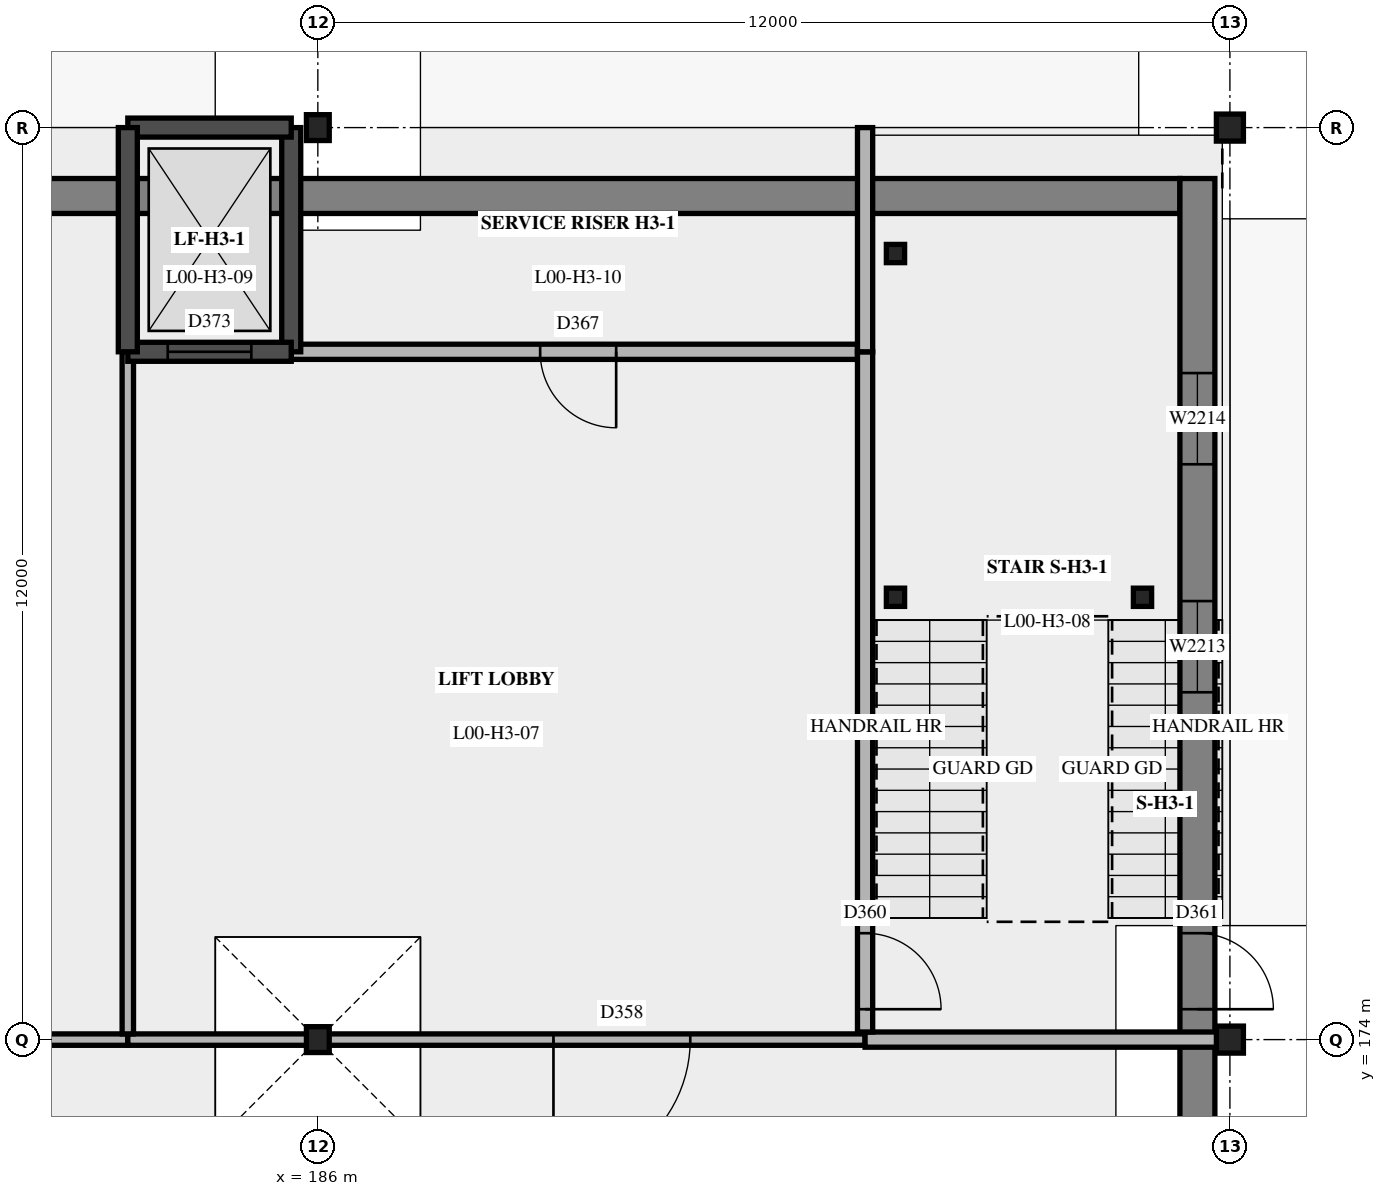
"""IFC4 building model, lengths in metres.
Left out: names, types, materials, properties, quantities, classifications, styles, units other than length and angle.
Written with IfcOpenShell. Run it as: python <this file> out.ifc"""

import sys

from ifc_helpers import new_model, si_unit, direction, frame, frame_2d, origin, origin_2d, place, context, subcontext, project, spatial, rectangle, hollow_circle, i_section, extrude, element, fill, save


model = new_model("IFC4")
c1 = context("Model", 3, precision=1e-05, world=origin(), true_north=direction((0.0, 1.0)))
c2 = subcontext(c1, "Body", "Model", "MODEL_VIEW")
j1 = project(units=[si_unit("LENGTHUNIT", "METRE"), si_unit("PLANEANGLEUNIT", "RADIAN")], contexts=[c1])
p1 = place(None, origin())
s1 = spatial("IfcSite", under=j1, at=p1, CompositionType="ELEMENT")
p2 = place(p1, origin())
s2 = spatial("IfcBuilding", under=s1, at=p2, CompositionType="ELEMENT")
p3 = place(p2, origin())
s3 = spatial("IfcBuildingStorey", under=s2, at=p3, CompositionType="ELEMENT", Elevation=0.0)
for number, where, z_axis, x_axis in (
    (1, (198.0, 174.0, 0.0), (0.0, 0.0, 1.0), (1.0, 0.0, 0.0)),
    (2, (198.0, 186.0, 0.0), (0.0, 0.0, 1.0), (1.0, 0.0, 0.0)),
):
    element("IfcColumn", number, at=place(p3, frame(where, z_axis=z_axis, x_axis=x_axis)), inside=s3, PredefinedType="COLUMN", context=c2, shape_type="SweptSolid", body=[
        extrude(hollow_circle(Radius=0.178, WallThickness=0.012, at=origin_2d()), origin(), (0.0, 0.0, 1.0), 5.4),
    ])
for number, where, z_axis, x_axis in (
    (3, (186.0, 174.0, 0.0), (0.0, 0.0, 1.0), (1.0, 0.0, 0.0)),
    (4, (186.0, 186.0, 0.0), (0.0, 0.0, 1.0), (1.0, 0.0, 0.0)),
):
    element("IfcColumn", number, at=place(p3, frame(where, z_axis=z_axis, x_axis=x_axis)), inside=s3, PredefinedType="COLUMN", context=c2, shape_type="SweptSolid", body=[
        extrude(i_section(OverallWidth=0.3, OverallDepth=0.34, WebThickness=0.012, FlangeThickness=0.021, at=origin_2d()), origin(), (0.0, 0.0, 1.0), 4.65),
    ])
p4 = place(p3, frame((162.658, 185.1, 0.0), z_axis=(0.0, 0.0, 1.0), x_axis=(1.0, 0.0, 0.0)))
e5 = element("IfcWall", 5, at=p4, inside=s3, PredefinedType="SOLIDWALL", context=c2, shape_type="SweptSolid", body=[
    extrude(rectangle(XDim=34.685, YDim=0.46, at=frame_2d((17.342, 0.0))), origin(), (0.0, 0.0, 1.0), 5.4),
])
p5 = place(p4, frame((9.9, 0.0, 0.9)))
e6 = element("IfcOpeningElement", 6, at=p5, cuts=e5, PredefinedType="OPENING", context=c2, shape_type="SweptSolid", body=[
    extrude(rectangle(XDim=1.2, YDim=3.3, at=frame_2d((0.6, 1.65))), frame((0.0, 0.24, 0.0), z_axis=(0.0, -1.0, 0.0), x_axis=(1.0, 0.0, 0.0)), (0.0, 0.0, 1.0), 0.48),
])
p6 = place(p4, frame((12.9, 0.0, 0.9)))
e7 = element("IfcOpeningElement", 7, at=p6, cuts=e5, PredefinedType="OPENING", context=c2, shape_type="SweptSolid", body=[
    extrude(rectangle(XDim=1.2, YDim=3.3, at=frame_2d((0.6, 1.65))), frame((0.0, 0.24, 0.0), z_axis=(0.0, -1.0, 0.0), x_axis=(1.0, 0.0, 0.0)), (0.0, 0.0, 1.0), 0.48),
])
p7 = place(p4, frame((15.9, 0.0, 0.9)))
e8 = element("IfcOpeningElement", 8, at=p7, cuts=e5, PredefinedType="OPENING", context=c2, shape_type="SweptSolid", body=[
    extrude(rectangle(XDim=1.2, YDim=3.3, at=frame_2d((0.6, 1.65))), frame((0.0, 0.24, 0.0), z_axis=(0.0, -1.0, 0.0), x_axis=(1.0, 0.0, 0.0)), (0.0, 0.0, 1.0), 0.48),
])
p8 = place(p3, frame((197.572, 138.67, 0.0), z_axis=(0.0, 0.0, 1.0), x_axis=(0.0, 1.0, 0.0)))
e9 = element("IfcWall", 9, at=p8, inside=s3, PredefinedType="SOLIDWALL", context=c2, shape_type="SweptSolid", body=[
    extrude(rectangle(XDim=46.66, YDim=0.46, at=frame_2d((23.33, 0.0))), origin(), (0.0, 0.0, 1.0), 5.4),
])
p9 = place(p8, frame((1.73, 0.0, 0.0)))
e10 = element("IfcOpeningElement", 10, at=p9, cuts=e9, PredefinedType="OPENING", context=c2, shape_type="SweptSolid", body=[
    extrude(rectangle(XDim=3.2, YDim=3.6, at=frame_2d((1.6, 1.8))), frame((0.0, 0.24, 0.0), z_axis=(0.0, -1.0, 0.0), x_axis=(1.0, 0.0, 0.0)), (0.0, 0.0, 1.0), 0.48),
])
p10 = place(p8, frame((36.73, 0.0, 0.0), z_axis=(0.0, 0.0, 1.0), x_axis=(-1.0, 0.0, 0.0)))
e11 = element("IfcOpeningElement", 11, at=p10, cuts=e9, PredefinedType="OPENING", context=c2, shape_type="SweptSolid", body=[
    extrude(rectangle(XDim=1.0, YDim=2.1, at=frame_2d((0.5, 1.05))), frame((0.0, 0.24, 0.0), z_axis=(0.0, -1.0, 0.0), x_axis=(1.0, 0.0, 0.0)), (0.0, 0.0, 1.0), 0.48),
])
p11 = place(p8, frame((15.73, 0.0, 0.0)))
e12 = element("IfcOpeningElement", 12, at=p11, cuts=e9, PredefinedType="OPENING", context=c2, shape_type="SweptSolid", body=[
    extrude(rectangle(XDim=3.2, YDim=3.6, at=frame_2d((1.6, 1.8))), frame((0.0, 0.24, 0.0), z_axis=(0.0, -1.0, 0.0), x_axis=(1.0, 0.0, 0.0)), (0.0, 0.0, 1.0), 0.48),
])
p12 = place(p8, frame((27.73, 0.0, 0.0)))
e13 = element("IfcOpeningElement", 13, at=p12, cuts=e9, PredefinedType="OPENING", context=c2, shape_type="SweptSolid", body=[
    extrude(rectangle(XDim=3.2, YDim=3.6, at=frame_2d((1.6, 1.8))), frame((0.0, 0.24, 0.0), z_axis=(0.0, -1.0, 0.0), x_axis=(1.0, 0.0, 0.0)), (0.0, 0.0, 1.0), 0.48),
])
p13 = place(p8, frame((26.83, 0.0, 0.0), z_axis=(0.0, 0.0, 1.0), x_axis=(-1.0, 0.0, 0.0)))
e14 = element("IfcOpeningElement", 14, at=p13, cuts=e9, PredefinedType="OPENING", context=c2, shape_type="SweptSolid", body=[
    extrude(rectangle(XDim=1.0, YDim=2.1, at=frame_2d((0.5, 1.05))), frame((0.0, 0.24, 0.0), z_axis=(0.0, -1.0, 0.0), x_axis=(1.0, 0.0, 0.0)), (0.0, 0.0, 1.0), 0.48),
])
p14 = place(p8, frame((39.9, 0.0, 0.9)))
e15 = element("IfcOpeningElement", 15, at=p14, cuts=e9, PredefinedType="OPENING", context=c2, shape_type="SweptSolid", body=[
    extrude(rectangle(XDim=1.2, YDim=3.3, at=frame_2d((0.6, 1.65))), frame((0.0, 0.24, 0.0), z_axis=(0.0, -1.0, 0.0), x_axis=(1.0, 0.0, 0.0)), (0.0, 0.0, 1.0), 0.48),
])
p15 = place(p8, frame((42.9, 0.0, 0.9)))
e16 = element("IfcOpeningElement", 16, at=p15, cuts=e9, PredefinedType="OPENING", context=c2, shape_type="SweptSolid", body=[
    extrude(rectangle(XDim=1.2, YDim=3.3, at=frame_2d((0.6, 1.65))), frame((0.0, 0.24, 0.0), z_axis=(0.0, -1.0, 0.0), x_axis=(1.0, 0.0, 0.0)), (0.0, 0.0, 1.0), 0.48),
])
p16 = place(p3, frame((162.0, 174.0, 0.0), z_axis=(0.0, 0.0, 1.0), x_axis=(1.0, 0.0, 0.0)))
e17 = element("IfcWall", 17, at=p16, inside=s3, PredefinedType="PARTITIONING", context=c2, shape_type="SweptSolid", body=[
    extrude(rectangle(XDim=21.5, YDim=0.15, at=frame_2d((10.75, 0.0))), origin(), (0.0, 0.0, 1.0), 4.65),
])
p17 = place(p16, frame((5.4, 0.0, 0.0)))
e18 = element("IfcOpeningElement", 18, at=p17, cuts=e17, PredefinedType="OPENING", context=c2, shape_type="SweptSolid", body=[
    extrude(rectangle(XDim=1.2, YDim=2.4, at=frame_2d((0.6, 1.2))), frame((0.0, 0.085, 0.0), z_axis=(0.0, -1.0, 0.0), x_axis=(1.0, 0.0, 0.0)), (0.0, 0.0, 1.0), 0.17),
])
p18 = place(p3, frame((183.5, 174.0, 0.0), z_axis=(0.0, 0.0, 1.0), x_axis=(1.0, 0.0, 0.0)))
e19 = element("IfcWall", 19, at=p18, inside=s3, PredefinedType="PARTITIONING", context=c2, shape_type="SweptSolid", body=[
    extrude(rectangle(XDim=9.7, YDim=0.15, at=frame_2d((4.85, 0.0))), origin(), (0.0, 0.0, 1.0), 4.65),
])
p19 = place(p18, frame((5.6, 0.0, 0.0)))
e20 = element("IfcOpeningElement", 20, at=p19, cuts=e19, PredefinedType="OPENING", context=c2, shape_type="SweptSolid", body=[
    extrude(rectangle(XDim=1.8, YDim=2.1, at=frame_2d((0.9, 1.05))), frame((0.0, 0.085, 0.0), z_axis=(0.0, -1.0, 0.0), x_axis=(1.0, 0.0, 0.0)), (0.0, 0.0, 1.0), 0.17),
])
p20 = place(p3, frame((193.2, 174.0, 0.0), z_axis=(0.0, 0.0, 1.0), x_axis=(1.0, 0.0, 0.0)))
e21 = element("IfcWall", 21, at=p20, inside=s3, PredefinedType="PARTITIONING", context=c2, shape_type="SweptSolid", body=[
    extrude(rectangle(XDim=4.8, YDim=0.2, at=frame_2d((2.4, 0.0))), origin(), (0.0, 0.0, 1.0), 4.65),
])
p21 = place(p3, frame((185.65, 183.05, 0.0), z_axis=(0.0, 0.0, 1.0), x_axis=(1.0, 0.0, 0.0)))
e22 = element("IfcWall", 22, at=p21, inside=s3, PredefinedType="PARTITIONING", context=c2, shape_type="SweptSolid", body=[
    extrude(rectangle(XDim=7.45, YDim=0.2, at=frame_2d((3.725, 0.0))), origin(), (0.0, 0.0, 1.0), 5.15),
])
p22 = place(p21, frame((3.275, 0.0, 0.0)))
e23 = element("IfcOpeningElement", 23, at=p22, cuts=e22, PredefinedType="OPENING", context=c2, shape_type="SweptSolid", body=[
    extrude(rectangle(XDim=1.0, YDim=2.1, at=frame_2d((0.5, 1.05))), frame((0.0, 0.11, 0.0), z_axis=(0.0, -1.0, 0.0), x_axis=(1.0, 0.0, 0.0)), (0.0, 0.0, 1.0), 0.22),
])
p23 = place(p3, frame((183.5, 174.075, 0.0), z_axis=(0.0, 0.0, 1.0), x_axis=(0.0, 1.0, 0.0)))
e24 = element("IfcWall", 24, at=p23, inside=s3, PredefinedType="PARTITIONING", context=c2, shape_type="SweptSolid", body=[
    extrude(rectangle(XDim=8.975, YDim=0.15, at=frame_2d((4.488, 0.0))), origin(), (0.0, 0.0, 1.0), 4.75),
])
p24 = place(p3, frame((193.2, 174.1, 0.0), z_axis=(0.0, 0.0, 1.0), x_axis=(0.0, 1.0, 0.0)))
e25 = element("IfcWall", 25, at=p24, inside=s3, PredefinedType="PARTITIONING", context=c2, shape_type="SweptSolid", body=[
    extrude(rectangle(XDim=8.95, YDim=0.2, at=frame_2d((4.475, 0.0))), origin(), (0.0, 0.0, 1.0), 5.15),
])
p25 = place(p24, frame((0.3, 0.0, 0.0)))
e26 = element("IfcOpeningElement", 26, at=p25, cuts=e25, PredefinedType="OPENING", context=c2, shape_type="SweptSolid", body=[
    extrude(rectangle(XDim=1.0, YDim=2.1, at=frame_2d((0.5, 1.05))), frame((0.0, 0.11, 0.0), z_axis=(0.0, -1.0, 0.0), x_axis=(1.0, 0.0, 0.0)), (0.0, 0.0, 1.0), 0.22),
])
p26 = place(p3, frame((193.2, 183.05, 0.0), z_axis=(0.0, 0.0, 1.0), x_axis=(0.0, 1.0, 0.0)))
e27 = element("IfcWall", 27, at=p26, inside=s3, PredefinedType="PARTITIONING", context=c2, shape_type="SweptSolid", body=[
    extrude(rectangle(XDim=2.95, YDim=0.2, at=frame_2d((1.475, 0.0))), origin(), (0.0, 0.0, 1.0), 5.15),
])
p27 = place(p3, frame((185.65, 183.05, -1.4), z_axis=(0.0, 0.0, 1.0), x_axis=(0.0, 1.0, 0.0)))
e28 = element("IfcWall", 28, at=p27, inside=s3, PredefinedType="SHEAR", context=c2, shape_type="SweptSolid", body=[
    extrude(rectangle(XDim=2.95, YDim=0.25, at=frame_2d((1.475, 0.0))), origin(), (0.0, 0.0, 1.0), 6.8),
])
p28 = place(p3, frame((185.65, 186.0, -1.4), z_axis=(0.0, 0.0, 1.0), x_axis=(-1.0, 0.0, 0.0)))
e29 = element("IfcWall", 29, at=p28, inside=s3, PredefinedType="SHEAR", context=c2, shape_type="SweptSolid", body=[
    extrude(rectangle(XDim=2.15, YDim=0.25, at=frame_2d((1.075, 0.0))), origin(), (0.0, 0.0, 1.0), 6.8),
])
p29 = place(p3, frame((183.5, 183.05, -1.4), z_axis=(0.0, 0.0, 1.0), x_axis=(1.0, 0.0, 0.0)))
e30 = element("IfcWall", 30, at=p29, inside=s3, PredefinedType="SHEAR", context=c2, shape_type="SweptSolid", body=[
    extrude(rectangle(XDim=2.15, YDim=0.25, at=frame_2d((1.075, 0.0))), origin(), (0.0, 0.0, 1.0), 6.8),
])
p30 = place(p29, frame((0.525, 0.0, 1.4)))
e31 = element("IfcOpeningElement", 31, at=p30, cuts=e30, PredefinedType="OPENING", context=c2, shape_type="SweptSolid", body=[
    extrude(rectangle(XDim=1.1, YDim=2.1, at=frame_2d((0.55, 1.05))), frame((0.0, 0.135, 0.0), z_axis=(0.0, -1.0, 0.0), x_axis=(1.0, 0.0, 0.0)), (0.0, 0.0, 1.0), 0.27),
])
p31 = place(p3, frame((183.5, 186.0, -1.4), z_axis=(0.0, 0.0, 1.0), x_axis=(0.0, -1.0, 0.0)))
e32 = element("IfcWall", 32, at=p31, inside=s3, PredefinedType="SHEAR", context=c2, shape_type="SweptSolid", body=[
    extrude(rectangle(XDim=2.95, YDim=0.25, at=frame_2d((1.475, 0.0))), origin(), (0.0, 0.0, 1.0), 6.8),
])
for number, where, z_axis, x_axis in (
    (33, (193.6, 179.82, 0.0), (0.0, 0.0, 1.0), (1.0, 0.0, 0.0)),
    (34, (193.6, 184.343, 0.0), (0.0, 0.0, 1.0), (1.0, 0.0, 0.0)),
    (35, (196.85, 179.82, 0.0), (0.0, 0.0, 1.0), (1.0, 0.0, 0.0)),
):
    element("IfcColumn", number, at=place(p3, frame(where, z_axis=z_axis, x_axis=x_axis)), inside=s3, PredefinedType="COLUMN", context=c2, shape_type="SweptSolid", body=[
        extrude(i_section(OverallWidth=0.24, OverallDepth=0.24, WebThickness=0.01, FlangeThickness=0.017, at=origin_2d()), origin(), (0.0, 0.0, 1.0), 2.5),
    ])
p32 = place(p10, origin())
e36 = element("IfcDoor", 36, at=p32, inside=s3, OperationType="SINGLE_SWING_RIGHT", PredefinedType="DOOR", context=c2, shape_type="SweptSolid", body=[
    extrude(rectangle(XDim=1.0, YDim=2.1, at=frame_2d((0.5, 1.05))), frame((0.0, 0.025, 0.0), z_axis=(0.0, -1.0, 0.0), x_axis=(1.0, 0.0, 0.0)), (0.0, 0.0, 1.0), 0.05),
])
fill(e11, e36)
p33 = place(p14, origin())
e37 = element("IfcWindow", 37, at=p33, inside=s3, PartitioningType="SINGLE_PANEL", PredefinedType="WINDOW", context=c2, shape_type="SweptSolid", body=[
    extrude(rectangle(XDim=1.2, YDim=3.3, at=frame_2d((0.6, 1.65))), frame((0.0, 0.03, 0.0), z_axis=(0.0, -1.0, 0.0), x_axis=(1.0, 0.0, 0.0)), (0.0, 0.0, 1.0), 0.06),
])
fill(e15, e37)
p34 = place(p15, origin())
e38 = element("IfcWindow", 38, at=p34, inside=s3, PartitioningType="SINGLE_PANEL", PredefinedType="WINDOW", context=c2, shape_type="SweptSolid", body=[
    extrude(rectangle(XDim=1.2, YDim=3.3, at=frame_2d((0.6, 1.65))), frame((0.0, 0.03, 0.0), z_axis=(0.0, -1.0, 0.0), x_axis=(1.0, 0.0, 0.0)), (0.0, 0.0, 1.0), 0.06),
])
fill(e16, e38)
p35 = place(p19, origin())
e39 = element("IfcDoor", 39, at=p35, inside=s3, OperationType="DOUBLE_DOOR_SINGLE_SWING", PredefinedType="DOOR", context=c2, shape_type="SweptSolid", body=[
    extrude(rectangle(XDim=1.8, YDim=2.1, at=frame_2d((0.9, 1.05))), frame((0.0, 0.025, 0.0), z_axis=(0.0, -1.0, 0.0), x_axis=(1.0, 0.0, 0.0)), (0.0, 0.0, 1.0), 0.05),
])
fill(e20, e39)
p36 = place(p25, origin())
e40 = element("IfcDoor", 40, at=p36, inside=s3, OperationType="SINGLE_SWING_RIGHT", PredefinedType="DOOR", context=c2, shape_type="SweptSolid", body=[
    extrude(rectangle(XDim=1.0, YDim=2.1, at=frame_2d((0.5, 1.05))), frame((0.0, 0.025, 0.0), z_axis=(0.0, -1.0, 0.0), x_axis=(1.0, 0.0, 0.0)), (0.0, 0.0, 1.0), 0.05),
])
fill(e26, e40)
p37 = place(p22, origin())
e41 = element("IfcDoor", 41, at=p37, inside=s3, OperationType="SINGLE_SWING_LEFT", PredefinedType="DOOR", context=c2, shape_type="SweptSolid", body=[
    extrude(rectangle(XDim=1.0, YDim=2.1, at=frame_2d((0.5, 1.05))), frame((0.0, 0.025, 0.0), z_axis=(0.0, -1.0, 0.0), x_axis=(1.0, 0.0, 0.0)), (0.0, 0.0, 1.0), 0.05),
])
fill(e23, e41)
p38 = place(p30, origin())
e42 = element("IfcDoor", 42, at=p38, inside=s3, OperationType="SLIDING_TO_LEFT", PredefinedType="DOOR", context=c2, shape_type="SweptSolid", body=[
    extrude(rectangle(XDim=1.1, YDim=2.1, at=frame_2d((0.55, 1.05))), frame((0.0, 0.025, 0.0), z_axis=(0.0, -1.0, 0.0), x_axis=(1.0, 0.0, 0.0)), (0.0, 0.0, 1.0), 0.05),
])
fill(e31, e42)
save(model, sys.argv[1])
